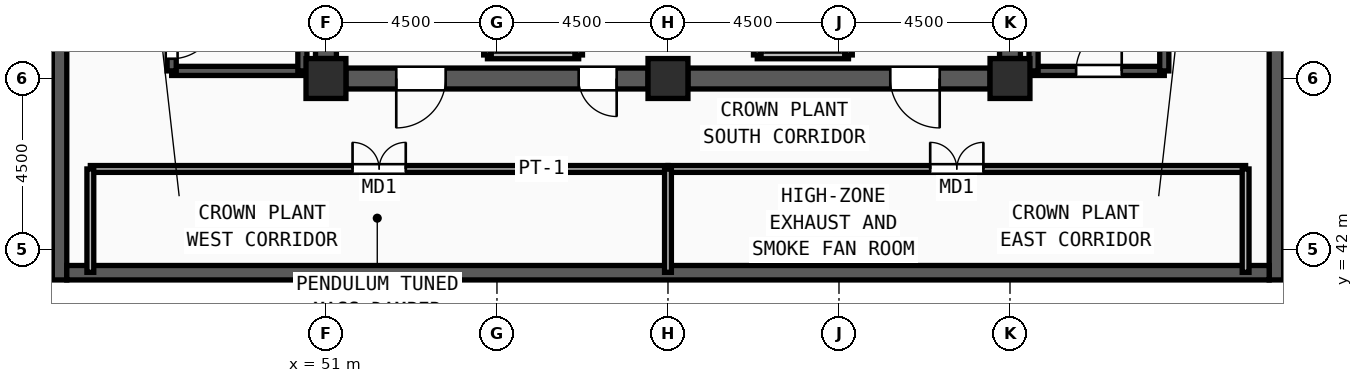
"""IFC4 building model, lengths in metres.
Left out: names, types, materials, properties, quantities, classifications, styles, units other than length and angle.
Written with IfcOpenShell. Run it as: python <this file> out.ifc"""

import sys

from ifc_helpers import new_model, si_unit, direction, frame, frame_2d, origin, origin_2d, place, context, subcontext, project, spatial, rectangle, extrude, source, transform, mapped, element, fill, save


model = new_model("IFC4")
c1 = context("Model", 3, precision=1e-05, world=origin(), true_north=direction((0.0, 1.0)))
c2 = subcontext(c1, "Body", "Model", "MODEL_VIEW")
j1 = project(units=[si_unit("LENGTHUNIT", "METRE"), si_unit("PLANEANGLEUNIT", "RADIAN")], contexts=[c1])
p1 = place(None, origin())
s1 = spatial("IfcSite", under=j1, at=p1, CompositionType="ELEMENT")
p2 = place(p1, origin())
s2 = spatial("IfcBuilding", under=s1, at=p2, CompositionType="ELEMENT")
p3 = place(p2, frame((0.0, 0.0, 366.0)))
s3 = spatial("IfcBuildingStorey", under=s2, at=p3, CompositionType="ELEMENT", Elevation=366.0)
m1 = source(origin(), c2, "Body", "SweptSolid", [
    extrude(rectangle(XDim=1.05, YDim=1.05, at=origin_2d()), origin(), (0.0, 0.0, 1.0), 5.4),
])
for number, where, z_axis, x_axis in (
    (1, (51.0, 46.5, 0.0), (0.0, 0.0, 1.0), (1.0, 0.0, 0.0)),
    (2, (60.0, 46.5, 0.0), (0.0, 0.0, 1.0), (1.0, 0.0, 0.0)),
    (3, (69.0, 46.5, 0.0), (0.0, 0.0, 1.0), (1.0, 0.0, 0.0)),
):
    element("IfcColumn", number, at=place(p3, frame(where, z_axis=z_axis, x_axis=x_axis)), inside=s3, PredefinedType="COLUMN", context=c2, shape_type="MappedRepresentation", body=[
        mapped(m1, transform((0.0, 0.0, 0.0), x_axis=(1.0, 0.0, 0.0), y_axis=(0.0, 1.0, 0.0), z_axis=(0.0, 0.0, 1.0), scale=1.0)),
    ])
for number, where, z_axis, x_axis in (
    (4, (43.99, 41.2, 0.0), (0.0, 0.0, 1.0), (0.0, 1.0, 0.0)),
    (5, (76.01, 68.5, 0.0), (0.0, 0.0, 1.0), (0.0, -1.0, 0.0)),
):
    element("IfcWall", number, at=place(p3, frame(where, z_axis=z_axis, x_axis=x_axis)), inside=s3, PredefinedType="SOLIDWALL", context=c2, shape_type="SweptSolid", body=[
        extrude(rectangle(XDim=27.3, YDim=0.38, at=frame_2d((13.65, 0.0))), origin(), (0.0, 0.0, 1.0), 4.95),
    ])
p4 = place(p3, frame((75.82, 41.39, 0.0), z_axis=(0.0, 0.0, 1.0), x_axis=(-1.0, 0.0, 0.0)))
e6 = element("IfcWall", 6, at=p4, inside=s3, PredefinedType="SOLIDWALL", context=c2, shape_type="SweptSolid", body=[
    extrude(rectangle(XDim=31.64, YDim=0.38, at=frame_2d((15.82, 0.0))), origin(), (0.0, 0.0, 1.0), 4.95),
])
p5 = place(p3, frame((69.0, 60.975, 0.0), z_axis=(0.0, 0.0, 1.0), x_axis=(0.0, -1.0, 0.0)))
e7 = element("IfcWall", 7, at=p5, inside=s3, PredefinedType="SHEAR", context=c2, shape_type="SweptSolid", body=[
    extrude(rectangle(XDim=13.95, YDim=0.55, at=frame_2d((6.975, 0.0))), origin(), (0.0, 0.0, 1.0), 4.95),
])
m2 = source(origin(), c2, "Body", "SweptSolid", [
    extrude(rectangle(XDim=1.2, YDim=2.2, at=frame_2d((0.6, 1.1))), frame((0.0, 0.285, 0.0), z_axis=(0.0, -1.0, 0.0), x_axis=(1.0, 0.0, 0.0)), (0.0, 0.0, 1.0), 0.57),
])
p6 = place(p5, frame((1.425, 0.0, 0.0)))
e8 = element("IfcOpeningElement", 8, at=p6, cuts=e7, PredefinedType="OPENING", context=c2, shape_type="MappedRepresentation", body=[
    mapped(m2, transform((0.0, 0.0, 0.0), x_axis=(1.0, 0.0, 0.0), y_axis=(0.0, 1.0, 0.0), z_axis=(0.0, 0.0, 1.0), scale=1.0)),
])
p7 = place(p3, frame((68.475, 46.5, 0.0), z_axis=(0.0, 0.0, 1.0), x_axis=(-1.0, 0.0, 0.0)))
e9 = element("IfcWall", 9, at=p7, inside=s3, PredefinedType="SHEAR", context=c2, shape_type="SweptSolid", body=[
    extrude(rectangle(XDim=7.95, YDim=0.55, at=frame_2d((3.975, 0.0))), origin(), (0.0, 0.0, 1.0), 4.95),
])
m3 = source(origin(), c2, "Body", "SweptSolid", [
    extrude(rectangle(XDim=1.3, YDim=2.2, at=frame_2d((0.65, 1.1))), frame((0.0, 0.285, 0.0), z_axis=(0.0, -1.0, 0.0), x_axis=(1.0, 0.0, 0.0)), (0.0, 0.0, 1.0), 0.57),
])
p8 = place(p7, frame((1.325, 0.0, 0.0)))
e10 = element("IfcOpeningElement", 10, at=p8, cuts=e9, PredefinedType="OPENING", context=c2, shape_type="MappedRepresentation", body=[
    mapped(m3, transform((0.0, 0.0, 0.0), x_axis=(1.0, 0.0, 0.0), y_axis=(0.0, 1.0, 0.0), z_axis=(0.0, 0.0, 1.0), scale=1.0)),
])
p9 = place(p3, frame((59.475, 46.5, 0.0), z_axis=(0.0, 0.0, 1.0), x_axis=(-1.0, 0.0, 0.0)))
e11 = element("IfcWall", 11, at=p9, inside=s3, PredefinedType="SHEAR", context=c2, shape_type="SweptSolid", body=[
    extrude(rectangle(XDim=7.95, YDim=0.55, at=frame_2d((3.975, 0.0))), origin(), (0.0, 0.0, 1.0), 4.95),
])
p10 = place(p9, frame((5.325, 0.0, 0.0)))
e12 = element("IfcOpeningElement", 12, at=p10, cuts=e11, PredefinedType="OPENING", context=c2, shape_type="MappedRepresentation", body=[
    mapped(m3, transform((0.0, 0.0, 0.0), x_axis=(1.0, 0.0, 0.0), y_axis=(0.0, 1.0, 0.0), z_axis=(0.0, 0.0, 1.0), scale=1.0)),
])
m4 = source(origin(), c2, "Body", "SweptSolid", [
    extrude(rectangle(XDim=1.0, YDim=2.2, at=frame_2d((0.5, 1.1))), frame((0.0, 0.285, 0.0), z_axis=(0.0, -1.0, 0.0), x_axis=(1.0, 0.0, 0.0)), (0.0, 0.0, 1.0), 0.57),
])
p11 = place(p9, frame((0.825, 0.0, 0.0)))
e13 = element("IfcOpeningElement", 13, at=p11, cuts=e11, PredefinedType="OPENING", context=c2, shape_type="MappedRepresentation", body=[
    mapped(m4, transform((0.0, 0.0, 0.0), x_axis=(1.0, 0.0, 0.0), y_axis=(0.0, 1.0, 0.0), z_axis=(0.0, 0.0, 1.0), scale=1.0)),
])
p12 = place(p3, frame((51.0, 47.025, 0.0), z_axis=(0.0, 0.0, 1.0), x_axis=(0.0, 1.0, 0.0)))
e14 = element("IfcWall", 14, at=p12, inside=s3, PredefinedType="SHEAR", context=c2, shape_type="SweptSolid", body=[
    extrude(rectangle(XDim=13.95, YDim=0.55, at=frame_2d((6.975, 0.0))), origin(), (0.0, 0.0, 1.0), 4.95),
])
p13 = place(p3, frame((46.94, 46.7, 0.0), z_axis=(0.0, 0.0, 1.0), x_axis=(1.0, 0.0, 0.0)))
e15 = element("IfcWall", 15, at=p13, inside=s3, PredefinedType="SOLIDWALL", context=c2, shape_type="SweptSolid", body=[
    extrude(rectangle(XDim=3.44, YDim=0.24, at=frame_2d((1.72, 0.0))), origin(), (0.0, 0.0, 1.0), 4.95),
])
p14 = place(p3, frame((50.38, 46.7, 0.0), z_axis=(0.0, 0.0, 1.0), x_axis=(0.0, 1.0, 0.0)))
e16 = element("IfcWall", 16, at=p14, inside=s3, PredefinedType="SOLIDWALL", context=c2, shape_type="SweptSolid", body=[
    extrude(rectangle(XDim=7.82, YDim=0.24, at=frame_2d((3.91, 0.0))), origin(), (0.0, 0.0, 1.0), 4.95),
])
p15 = place(p3, frame((46.94, 54.52, 0.0), z_axis=(0.0, 0.0, 1.0), x_axis=(0.0, -1.0, 0.0)))
e17 = element("IfcWall", 17, at=p15, inside=s3, PredefinedType="SOLIDWALL", context=c2, shape_type="SweptSolid", body=[
    extrude(rectangle(XDim=7.82, YDim=0.24, at=frame_2d((3.91, 0.0))), origin(), (0.0, 0.0, 1.0), 4.95),
])
m5 = source(origin(), c2, "Body", "SweptSolid", [
    extrude(rectangle(XDim=1.2, YDim=2.2, at=frame_2d((0.6, 1.1))), frame((0.0, 0.13, 0.0), z_axis=(0.0, -1.0, 0.0), x_axis=(1.0, 0.0, 0.0)), (0.0, 0.0, 1.0), 0.26),
])
p16 = place(p15, frame((6.3, 0.0, 0.0)))
e18 = element("IfcOpeningElement", 18, at=p16, cuts=e17, PredefinedType="OPENING", context=c2, shape_type="MappedRepresentation", body=[
    mapped(m5, transform((0.0, 0.0, 0.0), x_axis=(1.0, 0.0, 0.0), y_axis=(0.0, 1.0, 0.0), z_axis=(0.0, 0.0, 1.0), scale=1.0)),
])
p17 = place(p3, frame((69.62, 46.7, 0.0), z_axis=(0.0, 0.0, 1.0), x_axis=(1.0, 0.0, 0.0)))
e19 = element("IfcWall", 19, at=p17, inside=s3, PredefinedType="SOLIDWALL", context=c2, shape_type="SweptSolid", body=[
    extrude(rectangle(XDim=3.44, YDim=0.24, at=frame_2d((1.72, 0.0))), origin(), (0.0, 0.0, 1.0), 4.95),
])
p18 = place(p17, frame((1.12, 0.0, 0.0)))
e20 = element("IfcOpeningElement", 20, at=p18, cuts=e19, PredefinedType="OPENING", context=c2, shape_type="MappedRepresentation", body=[
    mapped(m5, transform((0.0, 0.0, 0.0), x_axis=(1.0, 0.0, 0.0), y_axis=(0.0, 1.0, 0.0), z_axis=(0.0, 0.0, 1.0), scale=1.0)),
])
for number, where, z_axis, x_axis in (
    (21, (73.06, 46.7, 0.0), (0.0, 0.0, 1.0), (0.0, 1.0, 0.0)),
    (22, (69.62, 54.52, 0.0), (0.0, 0.0, 1.0), (0.0, -1.0, 0.0)),
):
    element("IfcWall", number, at=place(p3, frame(where, z_axis=z_axis, x_axis=x_axis)), inside=s3, PredefinedType="SOLIDWALL", context=c2, shape_type="SweptSolid", body=[
        extrude(rectangle(XDim=7.82, YDim=0.24, at=frame_2d((3.91, 0.0))), origin(), (0.0, 0.0, 1.0), 4.95),
    ])
p19 = place(p3, frame((55.25, 47.12, 0.0), z_axis=(0.0, 0.0, 1.0), x_axis=(1.0, 0.0, 0.0)))
e23 = element("IfcWall", 23, at=p19, inside=s3, PredefinedType="SOLIDWALL", context=c2, shape_type="SweptSolid", body=[
    extrude(rectangle(XDim=2.4, YDim=0.2, at=frame_2d((1.2, 0.0))), origin(), (0.0, 0.0, 1.0), 4.95),
])
p20 = place(p3, frame((57.65, 47.12, 0.0), z_axis=(0.0, 0.0, 1.0), x_axis=(0.0, 1.0, 0.0)))
e24 = element("IfcWall", 24, at=p20, inside=s3, PredefinedType="SOLIDWALL", context=c2, shape_type="SweptSolid", body=[
    extrude(rectangle(XDim=3.0, YDim=0.2, at=frame_2d((1.5, 0.0))), origin(), (0.0, 0.0, 1.0), 4.95),
])
m6 = source(origin(), c2, "Body", "SweptSolid", [
    extrude(rectangle(XDim=1.2, YDim=2.3, at=frame_2d((0.6, 1.15))), frame((0.0, 0.11, 0.0), z_axis=(0.0, -1.0, 0.0), x_axis=(1.0, 0.0, 0.0)), (0.0, 0.0, 1.0), 0.22),
])
p21 = place(p20, frame((0.9, 0.0, 0.0)))
e25 = element("IfcOpeningElement", 25, at=p21, cuts=e24, PredefinedType="OPENING", context=c2, shape_type="MappedRepresentation", body=[
    mapped(m6, transform((0.0, 0.0, 0.0), x_axis=(1.0, 0.0, 0.0), y_axis=(0.0, 1.0, 0.0), z_axis=(0.0, 0.0, 1.0), scale=1.0)),
])
p22 = place(p3, frame((55.25, 50.12, 0.0), z_axis=(0.0, 0.0, 1.0), x_axis=(0.0, -1.0, 0.0)))
e26 = element("IfcWall", 26, at=p22, inside=s3, PredefinedType="SOLIDWALL", context=c2, shape_type="SweptSolid", body=[
    extrude(rectangle(XDim=3.0, YDim=0.2, at=frame_2d((1.5, 0.0))), origin(), (0.0, 0.0, 1.0), 4.95),
])
p23 = place(p3, frame((62.35, 47.12, 0.0), z_axis=(0.0, 0.0, 1.0), x_axis=(1.0, 0.0, 0.0)))
e27 = element("IfcWall", 27, at=p23, inside=s3, PredefinedType="SOLIDWALL", context=c2, shape_type="SweptSolid", body=[
    extrude(rectangle(XDim=2.4, YDim=0.2, at=frame_2d((1.2, 0.0))), origin(), (0.0, 0.0, 1.0), 4.95),
])
p24 = place(p3, frame((64.75, 47.12, 0.0), z_axis=(0.0, 0.0, 1.0), x_axis=(0.0, 1.0, 0.0)))
e28 = element("IfcWall", 28, at=p24, inside=s3, PredefinedType="SOLIDWALL", context=c2, shape_type="SweptSolid", body=[
    extrude(rectangle(XDim=3.0, YDim=0.2, at=frame_2d((1.5, 0.0))), origin(), (0.0, 0.0, 1.0), 4.95),
])
p25 = place(p3, frame((62.35, 50.12, 0.0), z_axis=(0.0, 0.0, 1.0), x_axis=(0.0, -1.0, 0.0)))
e29 = element("IfcWall", 29, at=p25, inside=s3, PredefinedType="SOLIDWALL", context=c2, shape_type="SweptSolid", body=[
    extrude(rectangle(XDim=3.0, YDim=0.2, at=frame_2d((1.5, 0.0))), origin(), (0.0, 0.0, 1.0), 4.95),
])
p26 = place(p25, frame((0.9, 0.0, 0.0)))
e30 = element("IfcOpeningElement", 30, at=p26, cuts=e29, PredefinedType="OPENING", context=c2, shape_type="MappedRepresentation", body=[
    mapped(m6, transform((0.0, 0.0, 0.0), x_axis=(1.0, 0.0, 0.0), y_axis=(0.0, 1.0, 0.0), z_axis=(0.0, 0.0, 1.0), scale=1.0)),
])
p27 = place(p3, frame((44.8, 44.12, 0.0), z_axis=(0.0, 0.0, 1.0), x_axis=(1.0, 0.0, 0.0)))
e31 = element("IfcWall", 31, at=p27, inside=s3, PredefinedType="PARTITIONING", context=c2, shape_type="SweptSolid", body=[
    extrude(rectangle(XDim=15.2, YDim=0.18, at=frame_2d((7.6, 0.0))), origin(), (0.0, 0.0, 1.0), 4.95),
])
m7 = source(origin(), c2, "Body", "SweptSolid", [
    extrude(rectangle(XDim=1.4, YDim=2.25, at=frame_2d((0.7, 1.125))), frame((0.0, 0.1, 0.0), z_axis=(0.0, -1.0, 0.0), x_axis=(1.0, 0.0, 0.0)), (0.0, 0.0, 1.0), 0.2),
])
p28 = place(p27, frame((6.9, 0.0, 0.0)))
e32 = element("IfcOpeningElement", 32, at=p28, cuts=e31, PredefinedType="OPENING", context=c2, shape_type="MappedRepresentation", body=[
    mapped(m7, transform((0.0, 0.0, 0.0), x_axis=(1.0, 0.0, 0.0), y_axis=(0.0, 1.0, 0.0), z_axis=(0.0, 0.0, 1.0), scale=1.0)),
])
p29 = place(p3, frame((60.0, 44.12, 0.0), z_axis=(0.0, 0.0, 1.0), x_axis=(1.0, 0.0, 0.0)))
e33 = element("IfcWall", 33, at=p29, inside=s3, PredefinedType="PARTITIONING", context=c2, shape_type="SweptSolid", body=[
    extrude(rectangle(XDim=15.2, YDim=0.18, at=frame_2d((7.6, 0.0))), origin(), (0.0, 0.0, 1.0), 4.95),
])
p30 = place(p29, frame((6.9, 0.0, 0.0)))
e34 = element("IfcOpeningElement", 34, at=p30, cuts=e33, PredefinedType="OPENING", context=c2, shape_type="MappedRepresentation", body=[
    mapped(m7, transform((0.0, 0.0, 0.0), x_axis=(1.0, 0.0, 0.0), y_axis=(0.0, 1.0, 0.0), z_axis=(0.0, 0.0, 1.0), scale=1.0)),
])
p31 = place(p3, frame((60.0, 41.4, 0.0), z_axis=(0.0, 0.0, 1.0), x_axis=(0.0, 1.0, 0.0)))
e35 = element("IfcWall", 35, at=p31, inside=s3, PredefinedType="PARTITIONING", context=c2, shape_type="SweptSolid", body=[
    extrude(rectangle(XDim=2.72, YDim=0.18, at=frame_2d((1.36, 0.0))), origin(), (0.0, 0.0, 1.0), 4.347),
])
for number, where, z_axis, x_axis in (
    (36, (44.8, 41.4, 0.0), (0.0, 0.0, 1.0), (0.0, 1.0, 0.0)),
    (37, (75.2, 41.4, 0.0), (0.0, 0.0, 1.0), (0.0, 1.0, 0.0)),
):
    element("IfcWall", number, at=place(p3, frame(where, z_axis=z_axis, x_axis=x_axis)), inside=s3, PredefinedType="PARTITIONING", context=c2, shape_type="SweptSolid", body=[
        extrude(rectangle(XDim=2.72, YDim=0.18, at=frame_2d((1.36, 0.0))), origin(), (0.0, 0.0, 1.0), 4.95),
    ])
m8 = source(origin(), c2, "Body", "SweptSolid", [
    extrude(rectangle(XDim=1.3, YDim=2.2, at=frame_2d((0.65, 1.1))), frame((0.0, 0.025, 0.0), z_axis=(0.0, -1.0, 0.0), x_axis=(1.0, 0.0, 0.0)), (0.0, 0.0, 1.0), 0.05),
])
p32 = place(p10, origin())
e38 = element("IfcDoor", 38, at=p32, inside=s3, OperationType="SINGLE_SWING_RIGHT", PredefinedType="DOOR", context=c2, shape_type="MappedRepresentation", body=[
    mapped(m8, transform((0.0, 0.0, 0.0), x_axis=(1.0, 0.0, 0.0), y_axis=(0.0, 1.0, 0.0), z_axis=(0.0, 0.0, 1.0), scale=1.0)),
])
fill(e12, e38)
m9 = source(origin(), c2, "Body", "SweptSolid", [
    extrude(rectangle(XDim=1.0, YDim=2.2, at=frame_2d((0.5, 1.1))), frame((0.0, 0.025, 0.0), z_axis=(0.0, -1.0, 0.0), x_axis=(1.0, 0.0, 0.0)), (0.0, 0.0, 1.0), 0.05),
])
p33 = place(p11, origin())
e39 = element("IfcDoor", 39, at=p33, inside=s3, OperationType="SINGLE_SWING_LEFT", PredefinedType="DOOR", context=c2, shape_type="MappedRepresentation", body=[
    mapped(m9, transform((0.0, 0.0, 0.0), x_axis=(1.0, 0.0, 0.0), y_axis=(0.0, 1.0, 0.0), z_axis=(0.0, 0.0, 1.0), scale=1.0)),
])
fill(e13, e39)
p34 = place(p8, origin())
e40 = element("IfcDoor", 40, at=p34, inside=s3, OperationType="SINGLE_SWING_LEFT", PredefinedType="DOOR", context=c2, shape_type="MappedRepresentation", body=[
    mapped(m8, transform((0.0, 0.0, 0.0), x_axis=(1.0, 0.0, 0.0), y_axis=(0.0, 1.0, 0.0), z_axis=(0.0, 0.0, 1.0), scale=1.0)),
])
fill(e10, e40)
m10 = source(origin(), c2, "Body", "SweptSolid", [
    extrude(rectangle(XDim=1.2, YDim=2.2, at=frame_2d((0.6, 1.1))), frame((0.0, 0.025, 0.0), z_axis=(0.0, -1.0, 0.0), x_axis=(1.0, 0.0, 0.0)), (0.0, 0.0, 1.0), 0.05),
])
p35 = place(p16, origin())
e41 = element("IfcDoor", 41, at=p35, inside=s3, OperationType="SINGLE_SWING_LEFT", PredefinedType="DOOR", context=c2, shape_type="MappedRepresentation", body=[
    mapped(m10, transform((0.0, 0.0, 0.0), x_axis=(1.0, 0.0, 0.0), y_axis=(0.0, 1.0, 0.0), z_axis=(0.0, 0.0, 1.0), scale=1.0)),
])
fill(e18, e41)
p36 = place(p18, origin())
e42 = element("IfcDoor", 42, at=p36, inside=s3, OperationType="SINGLE_SWING_RIGHT", PredefinedType="DOOR", context=c2, shape_type="MappedRepresentation", body=[
    mapped(m10, transform((0.0, 0.0, 0.0), x_axis=(1.0, 0.0, 0.0), y_axis=(0.0, 1.0, 0.0), z_axis=(0.0, 0.0, 1.0), scale=1.0)),
])
fill(e20, e42)
m11 = source(origin(), c2, "Body", "SweptSolid", [
    extrude(rectangle(XDim=1.4, YDim=2.25, at=frame_2d((0.7, 1.125))), frame((0.0, 0.025, 0.0), z_axis=(0.0, -1.0, 0.0), x_axis=(1.0, 0.0, 0.0)), (0.0, 0.0, 1.0), 0.05),
])
p37 = place(p28, origin())
e43 = element("IfcDoor", 43, at=p37, inside=s3, OperationType="DOUBLE_DOOR_SINGLE_SWING", PredefinedType="DOOR", context=c2, shape_type="MappedRepresentation", body=[
    mapped(m11, transform((0.0, 0.0, 0.0), x_axis=(1.0, 0.0, 0.0), y_axis=(0.0, 1.0, 0.0), z_axis=(0.0, 0.0, 1.0), scale=1.0)),
])
fill(e32, e43)
p38 = place(p30, origin())
e44 = element("IfcDoor", 44, at=p38, inside=s3, OperationType="DOUBLE_DOOR_SINGLE_SWING", PredefinedType="DOOR", context=c2, shape_type="MappedRepresentation", body=[
    mapped(m11, transform((0.0, 0.0, 0.0), x_axis=(1.0, 0.0, 0.0), y_axis=(0.0, 1.0, 0.0), z_axis=(0.0, 0.0, 1.0), scale=1.0)),
])
fill(e34, e44)
save(model, sys.argv[1])
